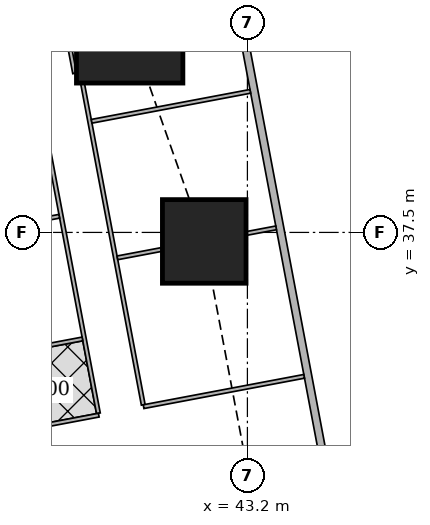
"""IFC4 building model, lengths in metres.
Left out: names, types, materials, properties, quantities, classifications, styles, units other than length and angle.
Written with IfcOpenShell. Run it as: python <this file> out.ifc"""

import sys

from ifc_helpers import new_model, si_unit, direction, frame, frame_2d, origin, origin_2d, place, context, subcontext, project, spatial, rectangle, extrude, element, fill, save


model = new_model("IFC4")
c1 = context("Model", 3, precision=1e-05, world=origin(), true_north=direction((0.0, 1.0)))
c2 = subcontext(c1, "Body", "Model", "MODEL_VIEW")
j1 = project(units=[si_unit("LENGTHUNIT", "METRE"), si_unit("PLANEANGLEUNIT", "RADIAN")], contexts=[c1])
p1 = place(None, origin())
s1 = spatial("IfcSite", under=j1, at=p1, CompositionType="ELEMENT")
p2 = place(p1, origin())
s2 = spatial("IfcBuilding", under=s1, at=p2, CompositionType="ELEMENT")
p3 = place(p2, frame((0.0, 0.0, 89.15)))
s3 = spatial("IfcBuildingStorey", under=s2, at=p3, CompositionType="ELEMENT", Elevation=89.15)
p4 = place(p3, frame((42.064, 37.263, 0.0), z_axis=(0.0, 0.0, 1.0), x_axis=(1.0, 0.0, 0.0)))
e1 = element("IfcColumn", 1, at=p4, inside=s3, PredefinedType="COLUMN", context=c2, shape_type="SweptSolid", body=[
    extrude(rectangle(XDim=2.2, YDim=2.2, at=origin_2d()), origin(), (0.0, 0.0, 1.0), 3.75),
])
p5 = place(p3, frame((40.102, 42.83, 0.0), z_axis=(0.0, 0.0, 1.0), x_axis=(1.0, 0.0, 0.0)))
e2 = element("IfcColumn", 2, at=p5, inside=s3, PredefinedType="COLUMN", context=c2, shape_type="SweptSolid", body=[
    extrude(rectangle(XDim=2.8, YDim=2.8, at=origin_2d()), origin(), (0.0, 0.0, 1.0), 3.75),
])
p6 = place(p3, frame((50.653, 2.703, 0.0), z_axis=(0.0, 0.0, 1.0), x_axis=(-0.185612026696, 0.982623109613, 0.0)))
e3 = element("IfcWall", 3, at=p6, inside=s3, PredefinedType="SOLIDWALL", context=c2, shape_type="SweptSolid", body=[
    extrude(rectangle(XDim=41.393, YDim=0.2, at=frame_2d((20.697, 0.0))), origin(), (0.0, 0.0, 1.0), 3.5),
])
p7 = place(p6, frame((1.633, 0.0, 0.9)))
e4 = element("IfcOpeningElement", 4, at=p7, cuts=e3, PredefinedType="OPENING", context=c2, shape_type="SweptSolid", body=[
    extrude(rectangle(XDim=1.8, YDim=1.5, at=frame_2d((0.9, 0.75))), frame((0.0, 0.11, 0.0), z_axis=(0.0, -1.0, 0.0), x_axis=(1.0, 0.0, 0.0)), (0.0, 0.0, 1.0), 0.22),
])
p8 = place(p6, frame((6.032, 0.0, 0.9)))
e5 = element("IfcOpeningElement", 5, at=p8, cuts=e3, PredefinedType="OPENING", context=c2, shape_type="SweptSolid", body=[
    extrude(rectangle(XDim=1.8, YDim=1.5, at=frame_2d((0.9, 0.75))), frame((0.0, 0.11, 0.0), z_axis=(0.0, -1.0, 0.0), x_axis=(1.0, 0.0, 0.0)), (0.0, 0.0, 1.0), 0.22),
])
p9 = place(p6, frame((9.848, 0.0, 0.9)))
e6 = element("IfcOpeningElement", 6, at=p9, cuts=e3, PredefinedType="OPENING", context=c2, shape_type="SweptSolid", body=[
    extrude(rectangle(XDim=1.8, YDim=1.5, at=frame_2d((0.9, 0.75))), frame((0.0, 0.11, 0.0), z_axis=(0.0, -1.0, 0.0), x_axis=(1.0, 0.0, 0.0)), (0.0, 0.0, 1.0), 0.22),
])
p10 = place(p6, frame((13.664, 0.0, 0.9)))
e7 = element("IfcOpeningElement", 7, at=p10, cuts=e3, PredefinedType="OPENING", context=c2, shape_type="SweptSolid", body=[
    extrude(rectangle(XDim=1.8, YDim=1.5, at=frame_2d((0.9, 0.75))), frame((0.0, 0.11, 0.0), z_axis=(0.0, -1.0, 0.0), x_axis=(1.0, 0.0, 0.0)), (0.0, 0.0, 1.0), 0.22),
])
p11 = place(p6, frame((17.481, 0.0, 0.9)))
e8 = element("IfcOpeningElement", 8, at=p11, cuts=e3, PredefinedType="OPENING", context=c2, shape_type="SweptSolid", body=[
    extrude(rectangle(XDim=1.8, YDim=1.5, at=frame_2d((0.9, 0.75))), frame((0.0, 0.11, 0.0), z_axis=(0.0, -1.0, 0.0), x_axis=(1.0, 0.0, 0.0)), (0.0, 0.0, 1.0), 0.22),
])
p12 = place(p6, frame((21.297, 0.0, 0.9)))
e9 = element("IfcOpeningElement", 9, at=p12, cuts=e3, PredefinedType="OPENING", context=c2, shape_type="SweptSolid", body=[
    extrude(rectangle(XDim=1.8, YDim=1.5, at=frame_2d((0.9, 0.75))), frame((0.0, 0.11, 0.0), z_axis=(0.0, -1.0, 0.0), x_axis=(1.0, 0.0, 0.0)), (0.0, 0.0, 1.0), 0.22),
])
p13 = place(p6, frame((25.113, 0.0, 0.9)))
e10 = element("IfcOpeningElement", 10, at=p13, cuts=e3, PredefinedType="OPENING", context=c2, shape_type="SweptSolid", body=[
    extrude(rectangle(XDim=1.8, YDim=1.5, at=frame_2d((0.9, 0.75))), frame((0.0, 0.11, 0.0), z_axis=(0.0, -1.0, 0.0), x_axis=(1.0, 0.0, 0.0)), (0.0, 0.0, 1.0), 0.22),
])
p14 = place(p6, frame((28.93, 0.0, 0.9)))
e11 = element("IfcOpeningElement", 11, at=p14, cuts=e3, PredefinedType="OPENING", context=c2, shape_type="SweptSolid", body=[
    extrude(rectangle(XDim=1.8, YDim=1.5, at=frame_2d((0.9, 0.75))), frame((0.0, 0.11, 0.0), z_axis=(0.0, -1.0, 0.0), x_axis=(1.0, 0.0, 0.0)), (0.0, 0.0, 1.0), 0.22),
])
p15 = place(p6, frame((32.746, 0.0, 0.9)))
e12 = element("IfcOpeningElement", 12, at=p15, cuts=e3, PredefinedType="OPENING", context=c2, shape_type="SweptSolid", body=[
    extrude(rectangle(XDim=1.8, YDim=1.5, at=frame_2d((0.9, 0.75))), frame((0.0, 0.11, 0.0), z_axis=(0.0, -1.0, 0.0), x_axis=(1.0, 0.0, 0.0)), (0.0, 0.0, 1.0), 0.22),
])
p16 = place(p6, frame((36.481, 0.0, 0.9)))
e13 = element("IfcOpeningElement", 13, at=p16, cuts=e3, PredefinedType="OPENING", context=c2, shape_type="SweptSolid", body=[
    extrude(rectangle(XDim=1.8, YDim=1.5, at=frame_2d((0.9, 0.75))), frame((0.0, 0.11, 0.0), z_axis=(0.0, -1.0, 0.0), x_axis=(1.0, 0.0, 0.0)), (0.0, 0.0, 1.0), 0.22),
])
p17 = place(p3, frame((33.127, 45.65, 0.0), z_axis=(0.0, 0.0, 1.0), x_axis=(0.185598547723, -0.98262565562, 0.0)))
e14 = element("IfcWall", 14, at=p17, inside=s3, PredefinedType="SOLIDWALL", context=c2, shape_type="SweptSolid", body=[
    extrude(rectangle(XDim=47.118, YDim=0.15, at=frame_2d((23.559, 0.0))), origin(), (0.0, 0.0, 1.0), 2.2),
])
p18 = place(p17, frame((15.285, 0.0, 0.0)))
e15 = element("IfcOpeningElement", 15, at=p18, cuts=e14, PredefinedType="OPENING", context=c2, shape_type="SweptSolid", body=[
    extrude(rectangle(XDim=1.0, YDim=2.1, at=frame_2d((0.5, 1.05))), frame((0.0, 0.085, 0.0), z_axis=(0.0, -1.0, 0.0), x_axis=(1.0, 0.0, 0.0)), (0.0, 0.0, 1.0), 0.17),
])
p19 = place(p17, frame((19.102, 0.0, 0.0)))
e16 = element("IfcOpeningElement", 16, at=p19, cuts=e14, PredefinedType="OPENING", context=c2, shape_type="SweptSolid", body=[
    extrude(rectangle(XDim=1.0, YDim=2.1, at=frame_2d((0.5, 1.05))), frame((0.0, 0.085, 0.0), z_axis=(0.0, -1.0, 0.0), x_axis=(1.0, 0.0, 0.0)), (0.0, 0.0, 1.0), 0.17),
])
p20 = place(p17, frame((33.88, 0.0, 0.0)))
e17 = element("IfcOpeningElement", 17, at=p20, cuts=e14, PredefinedType="OPENING", context=c2, shape_type="SweptSolid", body=[
    extrude(rectangle(XDim=1.0, YDim=2.1, at=frame_2d((0.5, 1.05))), frame((0.0, 0.085, 0.0), z_axis=(0.0, -1.0, 0.0), x_axis=(1.0, 0.0, 0.0)), (0.0, 0.0, 1.0), 0.17),
])
p21 = place(p3, frame((38.654, 41.686, 0.0), z_axis=(0.0, 0.0, 1.0), x_axis=(-0.185676896978, 0.982610853761, 0.0)))
e18 = element("IfcWall", 18, at=p21, inside=s3, PredefinedType="PARTITIONING", context=c2, shape_type="SweptSolid", body=[
    extrude(rectangle(XDim=4.034, YDim=0.1, at=frame_2d((2.017, 0.0))), origin(), (0.0, 0.0, 1.0), 2.05),
])
p22 = place(p3, frame((38.862, 41.42, 0.0), z_axis=(0.0, 0.0, 1.0), x_axis=(0.185574815416, -0.982630137887, 0.0)))
e19 = element("IfcWall", 19, at=p22, inside=s3, PredefinedType="PARTITIONING", context=c2, shape_type="SweptSolid", body=[
    extrude(rectangle(XDim=8.605, YDim=0.1, at=frame_2d((4.303, 0.0))), origin(), (0.0, 0.0, 1.0), 3.5),
])
p23 = place(p22, frame((7.555, 0.0, 0.0)))
e20 = element("IfcOpeningElement", 20, at=p23, cuts=e19, PredefinedType="OPENING", context=c2, shape_type="SweptSolid", body=[
    extrude(rectangle(XDim=0.9, YDim=2.1, at=frame_2d((0.45, 1.05))), frame((0.0, 0.06, 0.0), z_axis=(0.0, -1.0, 0.0), x_axis=(1.0, 0.0, 0.0)), (0.0, 0.0, 1.0), 0.12),
])
p24 = place(p22, frame((3.579, 0.0, 0.0)))
e21 = element("IfcOpeningElement", 21, at=p24, cuts=e19, PredefinedType="OPENING", context=c2, shape_type="SweptSolid", body=[
    extrude(rectangle(XDim=0.9, YDim=2.1, at=frame_2d((0.45, 1.05))), frame((0.0, 0.06, 0.0), z_axis=(0.0, -1.0, 0.0), x_axis=(1.0, 0.0, 0.0)), (0.0, 0.0, 1.0), 0.12),
])
p25 = place(p3, frame((37.473, 42.309, 0.0), z_axis=(0.0, 0.0, 1.0), x_axis=(0.185491912953, -0.982645790827, 0.0)))
e22 = element("IfcWall", 22, at=p25, inside=s3, PredefinedType="PARTITIONING", context=c2, shape_type="SweptSolid", body=[
    extrude(rectangle(XDim=9.737, YDim=0.1, at=frame_2d((4.869, 0.0))), origin(), (0.0, 0.0, 1.0), 3.5),
])
p26 = place(p25, frame((8.312, 0.0, 0.0)))
e23 = element("IfcOpeningElement", 23, at=p26, cuts=e22, PredefinedType="OPENING", context=c2, shape_type="SweptSolid", body=[
    extrude(rectangle(XDim=0.9, YDim=2.1, at=frame_2d((0.45, 1.05))), frame((0.0, 0.06, 0.0), z_axis=(0.0, -1.0, 0.0), x_axis=(1.0, 0.0, 0.0)), (0.0, 0.0, 1.0), 0.12),
])
p27 = place(p25, frame((2.853, 0.0, 0.0)))
e24 = element("IfcOpeningElement", 24, at=p27, cuts=e22, PredefinedType="OPENING", context=c2, shape_type="SweptSolid", body=[
    extrude(rectangle(XDim=0.9, YDim=2.1, at=frame_2d((0.45, 1.05))), frame((0.0, 0.06, 0.0), z_axis=(0.0, -1.0, 0.0), x_axis=(1.0, 0.0, 0.0)), (0.0, 0.0, 1.0), 0.12),
])
p28 = place(p25, frame((5.644, 0.0, 0.0)))
e25 = element("IfcOpeningElement", 25, at=p28, cuts=e22, PredefinedType="OPENING", context=c2, shape_type="SweptSolid", body=[
    extrude(rectangle(XDim=0.9, YDim=2.1, at=frame_2d((0.45, 1.05))), frame((0.0, 0.06, 0.0), z_axis=(0.0, -1.0, 0.0), x_axis=(1.0, 0.0, 0.0)), (0.0, 0.0, 1.0), 0.12),
])
p29 = place(p3, frame((43.277, 41.212, 0.0), z_axis=(0.0, 0.0, 1.0), x_axis=(-0.982665405803, -0.185387972203, 0.0)))
e26 = element("IfcWall", 26, at=p29, inside=s3, PredefinedType="PARTITIONING", context=c2, shape_type="SweptSolid", body=[
    extrude(rectangle(XDim=4.25, YDim=0.1, at=frame_2d((2.125, 0.0))), origin(), (0.0, 0.0, 1.0), 2.05),
])
p30 = place(p3, frame((43.955, 37.62, 0.0), z_axis=(0.0, 0.0, 1.0), x_axis=(-0.98247004097, -0.186420542316, 0.0)))
e27 = element("IfcWall", 27, at=p30, inside=s3, PredefinedType="PARTITIONING", context=c2, shape_type="SweptSolid", body=[
    extrude(rectangle(XDim=0.795, YDim=0.1, at=frame_2d((0.397, 0.0))), origin(), (0.0, 0.0, 1.0), 2.05),
])
p31 = place(p3, frame((40.954, 37.053, 0.0), z_axis=(0.0, 0.0, 1.0), x_axis=(-0.982628652346, -0.185582681276, 0.0)))
e28 = element("IfcWall", 28, at=p31, inside=s3, PredefinedType="PARTITIONING", context=c2, shape_type="SweptSolid", body=[
    extrude(rectangle(XDim=1.196, YDim=0.1, at=frame_2d((0.598, 0.0))), origin(), (0.0, 0.0, 1.0), 2.05),
])
p32 = place(p3, frame((44.693, 33.713, 0.0), z_axis=(0.0, 0.0, 1.0), x_axis=(-0.982633535512, -0.185556823879, 0.0)))
e29 = element("IfcWall", 29, at=p32, inside=s3, PredefinedType="PARTITIONING", context=c2, shape_type="SweptSolid", body=[
    extrude(rectangle(XDim=4.3, YDim=0.1, at=frame_2d((2.15, 0.0))), origin(), (0.0, 0.0, 1.0), 2.2),
])
p33 = place(p3, frame((38.25, 37.925, 0.0), z_axis=(0.0, 0.0, 1.0), x_axis=(-0.982626127294, -0.185596050493, 0.0)))
e30 = element("IfcWall", 30, at=p33, inside=s3, PredefinedType="PARTITIONING", context=c2, shape_type="SweptSolid", body=[
    extrude(rectangle(XDim=1.465, YDim=0.1, at=frame_2d((0.733, 0.0))), origin(), (0.0, 0.0, 1.0), 3.5),
])
p34 = place(p3, frame((39.289, 32.692, 0.0), z_axis=(0.0, 0.0, 1.0), x_axis=(-0.982662827464, -0.185401638399, 0.0)))
e31 = element("IfcWall", 31, at=p34, inside=s3, PredefinedType="PARTITIONING", context=c2, shape_type="SweptSolid", body=[
    extrude(rectangle(XDim=3.575, YDim=0.1, at=frame_2d((1.788, 0.0))), origin(), (0.0, 0.0, 1.0), 3.5),
])
p35 = place(p3, frame((38.859, 34.697, 0.0), z_axis=(0.0, 0.0, 1.0), x_axis=(-0.982626628545, -0.185593396635, 0.0)))
e32 = element("IfcWall", 32, at=p35, inside=s3, PredefinedType="PARTITIONING", context=c2, shape_type="SweptSolid", body=[
    extrude(rectangle(XDim=3.524, YDim=0.1, at=frame_2d((1.762, 0.0))), origin(), (0.0, 0.0, 1.0), 3.5),
])
p36 = place(p14, origin())
e33 = element("IfcWindow", 33, at=p36, inside=s3, PartitioningType="SINGLE_PANEL", PredefinedType="WINDOW", context=c2, shape_type="SweptSolid", body=[
    extrude(rectangle(XDim=1.8, YDim=1.5, at=frame_2d((0.9, 0.75))), frame((0.0, 0.03, 0.0), z_axis=(0.0, -1.0, 0.0), x_axis=(1.0, 0.0, 0.0)), (0.0, 0.0, 1.0), 0.06),
])
fill(e11, e33)
p37 = place(p15, origin())
e34 = element("IfcWindow", 34, at=p37, inside=s3, PartitioningType="SINGLE_PANEL", PredefinedType="WINDOW", context=c2, shape_type="SweptSolid", body=[
    extrude(rectangle(XDim=1.8, YDim=1.5, at=frame_2d((0.9, 0.75))), frame((0.0, 0.03, 0.0), z_axis=(0.0, -1.0, 0.0), x_axis=(1.0, 0.0, 0.0)), (0.0, 0.0, 1.0), 0.06),
])
fill(e12, e34)
p38 = place(p16, origin())
e35 = element("IfcWindow", 35, at=p38, inside=s3, PartitioningType="SINGLE_PANEL", PredefinedType="WINDOW", context=c2, shape_type="SweptSolid", body=[
    extrude(rectangle(XDim=1.8, YDim=1.5, at=frame_2d((0.9, 0.75))), frame((0.0, 0.03, 0.0), z_axis=(0.0, -1.0, 0.0), x_axis=(1.0, 0.0, 0.0)), (0.0, 0.0, 1.0), 0.06),
])
fill(e13, e35)
p39 = place(p23, origin())
e36 = element("IfcDoor", 36, at=p39, inside=s3, OperationType="SINGLE_SWING_RIGHT", PredefinedType="DOOR", context=c2, shape_type="SweptSolid", body=[
    extrude(rectangle(XDim=0.9, YDim=2.1, at=frame_2d((0.45, 1.05))), frame((0.0, 0.025, 0.0), z_axis=(0.0, -1.0, 0.0), x_axis=(1.0, 0.0, 0.0)), (0.0, 0.0, 1.0), 0.05),
])
fill(e20, e36)
p40 = place(p24, origin())
e37 = element("IfcDoor", 37, at=p40, inside=s3, OperationType="SINGLE_SWING_RIGHT", PredefinedType="DOOR", context=c2, shape_type="SweptSolid", body=[
    extrude(rectangle(XDim=0.9, YDim=2.1, at=frame_2d((0.45, 1.05))), frame((0.0, 0.025, 0.0), z_axis=(0.0, -1.0, 0.0), x_axis=(1.0, 0.0, 0.0)), (0.0, 0.0, 1.0), 0.05),
])
fill(e21, e37)
p41 = place(p26, origin())
e38 = element("IfcDoor", 38, at=p41, inside=s3, OperationType="SINGLE_SWING_LEFT", PredefinedType="DOOR", context=c2, shape_type="SweptSolid", body=[
    extrude(rectangle(XDim=0.9, YDim=2.1, at=frame_2d((0.45, 1.05))), frame((0.0, 0.025, 0.0), z_axis=(0.0, -1.0, 0.0), x_axis=(1.0, 0.0, 0.0)), (0.0, 0.0, 1.0), 0.05),
])
fill(e23, e38)
p42 = place(p27, origin())
e39 = element("IfcDoor", 39, at=p42, inside=s3, OperationType="SINGLE_SWING_RIGHT", PredefinedType="DOOR", context=c2, shape_type="SweptSolid", body=[
    extrude(rectangle(XDim=0.9, YDim=2.1, at=frame_2d((0.45, 1.05))), frame((0.0, 0.025, 0.0), z_axis=(0.0, -1.0, 0.0), x_axis=(1.0, 0.0, 0.0)), (0.0, 0.0, 1.0), 0.05),
])
fill(e24, e39)
p43 = place(p28, origin())
e40 = element("IfcDoor", 40, at=p43, inside=s3, OperationType="SINGLE_SWING_RIGHT", PredefinedType="DOOR", context=c2, shape_type="SweptSolid", body=[
    extrude(rectangle(XDim=0.9, YDim=2.1, at=frame_2d((0.45, 1.05))), frame((0.0, 0.025, 0.0), z_axis=(0.0, -1.0, 0.0), x_axis=(1.0, 0.0, 0.0)), (0.0, 0.0, 1.0), 0.05),
])
fill(e25, e40)
save(model, sys.argv[1])
